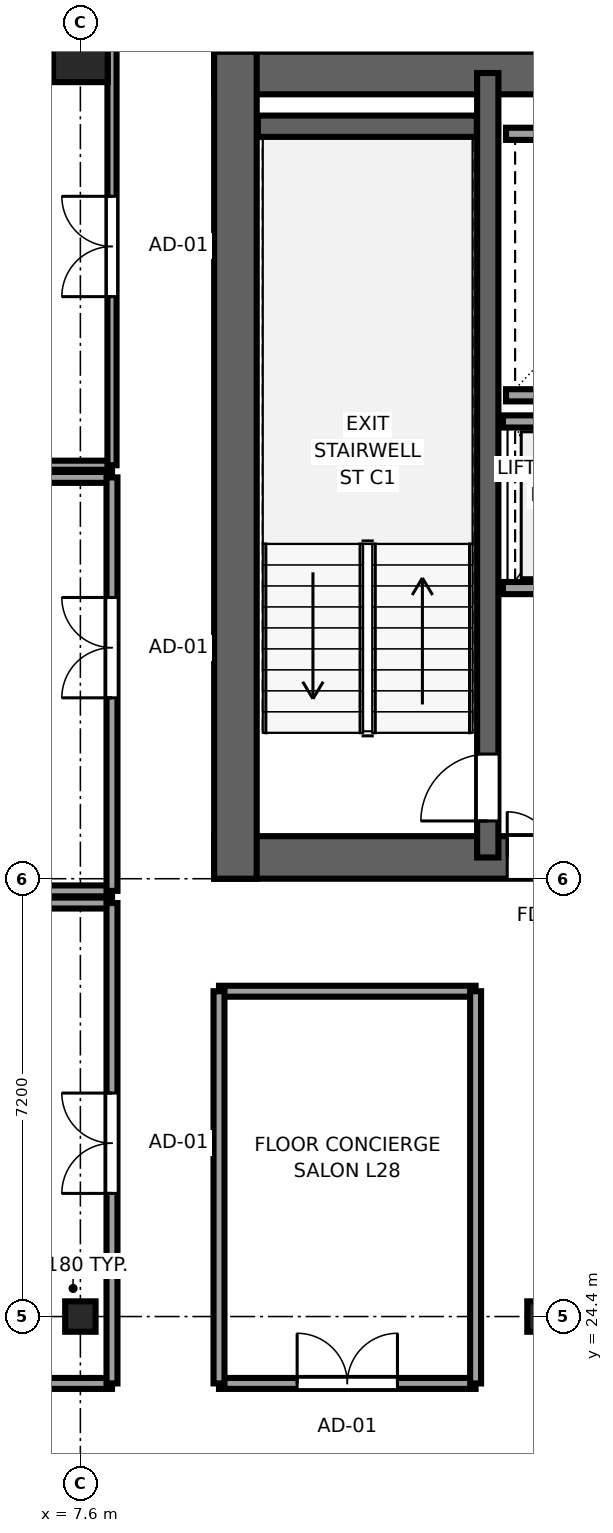
"""IFC4 building model, lengths in metres.
Left out: names, types, materials, properties, quantities, classifications, styles, units other than length and angle.
Written with IfcOpenShell. Run it as: python <this file> out.ifc"""

import sys

from ifc_helpers import new_model, si_unit, direction, frame, frame_2d, origin, origin_2d, place, context, subcontext, project, spatial, rectangle, i_section, extrude, source, transform, mapped, element, fill, save


model = new_model("IFC4")
c1 = context("Model", 3, precision=1e-05, world=origin(), true_north=direction((0.0, 1.0)))
c2 = subcontext(c1, "Body", "Model", "MODEL_VIEW")
j1 = project(units=[si_unit("LENGTHUNIT", "METRE"), si_unit("PLANEANGLEUNIT", "RADIAN")], contexts=[c1])
p1 = place(None, origin())
s1 = spatial("IfcSite", under=j1, at=p1, CompositionType="ELEMENT")
p2 = place(p1, origin())
s2 = spatial("IfcBuilding", under=s1, at=p2, CompositionType="ELEMENT")
p3 = place(p2, frame((0.0, 0.0, 111.55)))
s3 = spatial("IfcBuildingStorey", under=s2, at=p3, CompositionType="ELEMENT", Elevation=111.55)
p4 = place(p3, frame((9.8, 31.95, 0.0), z_axis=(0.0, 0.0, 1.0), x_axis=(1.0, 0.0, 0.0)))
e1 = element("IfcWall", 1, at=p4, inside=s3, PredefinedType="SHEAR", context=c2, shape_type="SweptSolid", body=[
    extrude(rectangle(XDim=26.4, YDim=0.7, at=frame_2d((13.2, 0.0))), origin(), (0.0, 0.0, 1.0), 3.55),
])
p5 = place(p4, frame((6.32, 0.0, 0.0), z_axis=(0.0, 0.0, 1.0), x_axis=(-1.0, 0.0, 0.0)))
e2 = element("IfcOpeningElement", 2, at=p5, cuts=e1, PredefinedType="OPENING", context=c2, shape_type="SweptSolid", body=[
    extrude(rectangle(XDim=1.5, YDim=2.04, at=frame_2d((0.75, 1.02))), frame((0.0, 0.36, 0.0), z_axis=(0.0, -1.0, 0.0), x_axis=(1.0, 0.0, 0.0)), (0.0, 0.0, 1.0), 0.72),
])
p6 = place(p4, frame((13.95, 0.0, 0.0), z_axis=(0.0, 0.0, 1.0), x_axis=(-1.0, 0.0, 0.0)))
e3 = element("IfcOpeningElement", 3, at=p6, cuts=e1, PredefinedType="OPENING", context=c2, shape_type="SweptSolid", body=[
    extrude(rectangle(XDim=1.5, YDim=2.04, at=frame_2d((0.75, 1.02))), frame((0.0, 0.36, 0.0), z_axis=(0.0, -1.0, 0.0), x_axis=(1.0, 0.0, 0.0)), (0.0, 0.0, 1.0), 0.72),
])
p7 = place(p4, frame((20.25, 0.0, 0.0), z_axis=(0.0, 0.0, 1.0), x_axis=(-1.0, 0.0, 0.0)))
e4 = element("IfcOpeningElement", 4, at=p7, cuts=e1, PredefinedType="OPENING", context=c2, shape_type="SweptSolid", body=[
    extrude(rectangle(XDim=1.5, YDim=2.04, at=frame_2d((0.75, 1.02))), frame((0.0, 0.36, 0.0), z_axis=(0.0, -1.0, 0.0), x_axis=(1.0, 0.0, 0.0)), (0.0, 0.0, 1.0), 0.72),
])
p8 = place(p4, frame((8.37, 0.0, 0.0), z_axis=(0.0, 0.0, 1.0), x_axis=(-1.0, 0.0, 0.0)))
e5 = element("IfcOpeningElement", 5, at=p8, cuts=e1, PredefinedType="OPENING", context=c2, shape_type="SweptSolid", body=[
    extrude(rectangle(XDim=0.82, YDim=2.01, at=frame_2d((0.41, 1.005))), frame((0.0, 0.36, 0.0), z_axis=(0.0, -1.0, 0.0), x_axis=(1.0, 0.0, 0.0)), (0.0, 0.0, 1.0), 0.72),
])
p9 = place(p3, frame((9.8, 44.85, 0.0), z_axis=(0.0, 0.0, 1.0), x_axis=(1.0, 0.0, 0.0)))
e6 = element("IfcWall", 6, at=p9, inside=s3, PredefinedType="SHEAR", context=c2, shape_type="SweptSolid", body=[
    extrude(rectangle(XDim=26.4, YDim=0.7, at=frame_2d((13.2, 0.0))), origin(), (0.0, 0.0, 1.0), 3.55),
])
p10 = place(p3, frame((10.15, 31.6, 0.0), z_axis=(0.0, 0.0, 1.0), x_axis=(0.0, 1.0, 0.0)))
e7 = element("IfcWall", 7, at=p10, inside=s3, PredefinedType="SHEAR", context=c2, shape_type="SweptSolid", body=[
    extrude(rectangle(XDim=13.6, YDim=0.7, at=frame_2d((6.8, 0.0))), origin(), (0.0, 0.0, 1.0), 3.55),
])
p11 = place(p3, frame((14.3, 31.95, 0.0), z_axis=(0.0, 0.0, 1.0), x_axis=(0.0, 1.0, 0.0)))
e8 = element("IfcWall", 8, at=p11, inside=s3, PredefinedType="SHEAR", context=c2, shape_type="SweptSolid", body=[
    extrude(rectangle(XDim=12.9, YDim=0.35, at=frame_2d((6.45, 0.0))), origin(), (0.0, 0.0, 1.0), 3.55),
])
p12 = place(p11, frame((0.6, 0.0, 0.0)))
e9 = element("IfcOpeningElement", 9, at=p12, cuts=e8, PredefinedType="OPENING", context=c2, shape_type="SweptSolid", body=[
    extrude(rectangle(XDim=1.1, YDim=2.12, at=frame_2d((0.55, 1.06))), frame((0.0, 0.185, 0.0), z_axis=(0.0, -1.0, 0.0), x_axis=(1.0, 0.0, 0.0)), (0.0, 0.0, 1.0), 0.37),
])
p13 = place(p3, frame((10.52, 43.975, 0.0), z_axis=(0.0, 0.0, 1.0), x_axis=(1.0, 0.0, 0.0)))
e10 = element("IfcWall", 10, at=p13, inside=s3, PredefinedType="SHEAR", context=c2, shape_type="SweptSolid", body=[
    extrude(rectangle(XDim=3.6, YDim=0.35, at=frame_2d((1.8, 0.0))), origin(), (0.0, 0.0, 1.0), 3.55),
])
m1 = source(origin(), c2, "Body", "SweptSolid", [
    extrude(i_section(OverallWidth=0.5, OverallDepth=0.5, WebThickness=0.022, FlangeThickness=0.034, at=origin_2d()), origin(), (0.0, 0.0, 1.0), 3.55),
])
for number, where, z_axis, x_axis in (
    (11, (7.6, 24.4, 0.0), (0.0, 0.0, 1.0), (1.0, 0.0, 0.0)),
    (12, (15.2, 24.4, 0.0), (0.0, 0.0, 1.0), (1.0, 0.0, 0.0)),
):
    element("IfcColumn", number, at=place(p3, frame(where, z_axis=z_axis, x_axis=x_axis)), inside=s3, PredefinedType="COLUMN", context=c2, shape_type="MappedRepresentation", body=[
        mapped(m1, transform((0.0, 0.0, 0.0), x_axis=(1.0, 0.0, 0.0), y_axis=(0.0, 1.0, 0.0), z_axis=(0.0, 0.0, 1.0), scale=1.0)),
    ])
m2 = source(origin(), c2, "Body", "SweptSolid", [
    extrude(rectangle(XDim=0.9, YDim=0.9, at=origin_2d()), origin(), (0.0, 0.0, 1.0), 3.55),
])
p14 = place(p3, frame((7.6, 45.15, 0.0), z_axis=(0.0, 0.0, 1.0), x_axis=(1.0, 0.0, 0.0)))
e13 = element("IfcColumn", 13, at=p14, inside=s3, PredefinedType="COLUMN", context=c2, shape_type="MappedRepresentation", body=[
    mapped(m2, transform((0.0, 0.0, 0.0), x_axis=(1.0, 0.0, 0.0), y_axis=(0.0, 1.0, 0.0), z_axis=(0.0, 0.0, 1.0), scale=1.0)),
])
for number, where, z_axis, x_axis in (
    (14, (14.6, 39.55, 0.0), (0.0, 0.0, 1.0), (1.0, 0.0, 0.0)),
    (15, (14.6, 43.85, 0.0), (0.0, 0.0, 1.0), (1.0, 0.0, 0.0)),
):
    element("IfcWall", number, at=place(p3, frame(where, z_axis=z_axis, x_axis=x_axis)), inside=s3, PredefinedType="SOLIDWALL", context=c2, shape_type="SweptSolid", body=[
        extrude(rectangle(XDim=4.1, YDim=0.2, at=frame_2d((2.05, 0.0))), origin(), (0.0, 0.0, 1.0), 3.37),
    ])
p15 = place(p3, frame((14.55, 36.38, 0.0), z_axis=(0.0, 0.0, 1.0), x_axis=(1.0, 0.0, 0.0)))
e16 = element("IfcWall", 16, at=p15, inside=s3, PredefinedType="SOLIDWALL", context=c2, shape_type="SweptSolid", body=[
    extrude(rectangle(XDim=4.075, YDim=0.2, at=frame_2d((2.038, 0.0))), origin(), (0.0, 0.0, 1.0), 3.37),
])
p16 = place(p15, frame((0.55, 0.0, 0.0)))
e17 = element("IfcOpeningElement", 17, at=p16, cuts=e16, PredefinedType="OPENING", context=c2, shape_type="SweptSolid", body=[
    extrude(rectangle(XDim=1.1, YDim=2.12, at=frame_2d((0.55, 1.06))), frame((0.0, 0.11, 0.0), z_axis=(0.0, -1.0, 0.0), x_axis=(1.0, 0.0, 0.0)), (0.0, 0.0, 1.0), 0.22),
])
p17 = place(p15, frame((2.45, 0.0, 0.0)))
e18 = element("IfcOpeningElement", 18, at=p17, cuts=e16, PredefinedType="OPENING", context=c2, shape_type="SweptSolid", body=[
    extrude(rectangle(XDim=1.1, YDim=2.12, at=frame_2d((0.55, 1.06))), frame((0.0, 0.11, 0.0), z_axis=(0.0, -1.0, 0.0), x_axis=(1.0, 0.0, 0.0)), (0.0, 0.0, 1.0), 0.22),
])
p18 = place(p3, frame((14.55, 39.12, 0.0), z_axis=(0.0, 0.0, 1.0), x_axis=(1.0, 0.0, 0.0)))
e19 = element("IfcWall", 19, at=p18, inside=s3, PredefinedType="SOLIDWALL", context=c2, shape_type="SweptSolid", body=[
    extrude(rectangle(XDim=4.075, YDim=0.2, at=frame_2d((2.038, 0.0))), origin(), (0.0, 0.0, 1.0), 3.37),
])
for number, where, z_axis, x_axis in (
    (20, (0.405, 23.3, 0.0), (0.0, 0.0, 1.0), (1.0, 0.0, 0.0)),
    (21, (0.405, 31.2, 0.0), (0.0, 0.0, 1.0), (1.0, 0.0, 0.0)),
):
    element("IfcWall", number, at=place(p3, frame(where, z_axis=z_axis, x_axis=x_axis)), inside=s3, PredefinedType="PARTITIONING", context=c2, shape_type="SweptSolid", body=[
        extrude(rectangle(XDim=7.715, YDim=0.18, at=frame_2d((3.857, 0.0))), origin(), (0.0, 0.0, 1.0), 3.37),
    ])
p19 = place(p3, frame((8.12, 23.3, 0.0), z_axis=(0.0, 0.0, 1.0), x_axis=(0.0, 1.0, 0.0)))
e22 = element("IfcWall", 22, at=p19, inside=s3, PredefinedType="PARTITIONING", context=c2, shape_type="SweptSolid", body=[
    extrude(rectangle(XDim=7.9, YDim=0.18, at=frame_2d((3.95, 0.0))), origin(), (0.0, 0.0, 1.0), 3.37),
])
p20 = place(p19, frame((3.125, 0.0, 0.0)))
e23 = element("IfcOpeningElement", 23, at=p20, cuts=e22, PredefinedType="OPENING", context=c2, shape_type="SweptSolid", body=[
    extrude(rectangle(XDim=1.65, YDim=2.15, at=frame_2d((0.825, 1.075))), frame((0.0, 0.1, 0.0), z_axis=(0.0, -1.0, 0.0), x_axis=(1.0, 0.0, 0.0)), (0.0, 0.0, 1.0), 0.2),
])
for number, where, z_axis, x_axis in (
    (24, (0.405, 31.4, 0.0), (0.0, 0.0, 1.0), (1.0, 0.0, 0.0)),
    (25, (0.405, 38.2, 0.0), (0.0, 0.0, 1.0), (1.0, 0.0, 0.0)),
):
    element("IfcWall", number, at=place(p3, frame(where, z_axis=z_axis, x_axis=x_axis)), inside=s3, PredefinedType="PARTITIONING", context=c2, shape_type="SweptSolid", body=[
        extrude(rectangle(XDim=7.715, YDim=0.18, at=frame_2d((3.857, 0.0))), origin(), (0.0, 0.0, 1.0), 3.37),
    ])
p21 = place(p3, frame((8.12, 31.4, 0.0), z_axis=(0.0, 0.0, 1.0), x_axis=(0.0, 1.0, 0.0)))
e26 = element("IfcWall", 26, at=p21, inside=s3, PredefinedType="PARTITIONING", context=c2, shape_type="SweptSolid", body=[
    extrude(rectangle(XDim=6.8, YDim=0.18, at=frame_2d((3.4, 0.0))), origin(), (0.0, 0.0, 1.0), 3.37),
])
p22 = place(p21, frame((3.175, 0.0, 0.0)))
e27 = element("IfcOpeningElement", 27, at=p22, cuts=e26, PredefinedType="OPENING", context=c2, shape_type="SweptSolid", body=[
    extrude(rectangle(XDim=1.65, YDim=2.15, at=frame_2d((0.825, 1.075))), frame((0.0, 0.1, 0.0), z_axis=(0.0, -1.0, 0.0), x_axis=(1.0, 0.0, 0.0)), (0.0, 0.0, 1.0), 0.2),
])
p23 = place(p3, frame((0.405, 38.4, 0.0), z_axis=(0.0, 0.0, 1.0), x_axis=(1.0, 0.0, 0.0)))
e28 = element("IfcWall", 28, at=p23, inside=s3, PredefinedType="PARTITIONING", context=c2, shape_type="SweptSolid", body=[
    extrude(rectangle(XDim=7.715, YDim=0.15, at=frame_2d((3.857, 0.0))), origin(), (0.0, 0.0, 1.0), 3.37),
])
p24 = place(p3, frame((8.12, 38.4, 0.0), z_axis=(0.0, 0.0, 1.0), x_axis=(0.0, 1.0, 0.0)))
e29 = element("IfcWall", 29, at=p24, inside=s3, PredefinedType="PARTITIONING", context=c2, shape_type="SweptSolid", body=[
    extrude(rectangle(XDim=7.195, YDim=0.15, at=frame_2d((3.598, 0.0))), origin(), (0.0, 0.0, 1.0), 3.37),
])
p25 = place(p24, frame((2.772, 0.0, 0.0)))
e30 = element("IfcOpeningElement", 30, at=p25, cuts=e29, PredefinedType="OPENING", context=c2, shape_type="SweptSolid", body=[
    extrude(rectangle(XDim=1.65, YDim=2.15, at=frame_2d((0.825, 1.075))), frame((0.0, 0.085, 0.0), z_axis=(0.0, -1.0, 0.0), x_axis=(1.0, 0.0, 0.0)), (0.0, 0.0, 1.0), 0.17),
])
p26 = place(p3, frame((9.88, 23.3, 0.0), z_axis=(0.0, 0.0, 1.0), x_axis=(1.0, 0.0, 0.0)))
e31 = element("IfcWall", 31, at=p26, inside=s3, PredefinedType="PARTITIONING", context=c2, shape_type="SweptSolid", body=[
    extrude(rectangle(XDim=4.22, YDim=0.18, at=frame_2d((2.11, 0.0))), origin(), (0.0, 0.0, 1.0), 3.37),
])
p27 = place(p26, frame((1.285, 0.0, 0.0)))
e32 = element("IfcOpeningElement", 32, at=p27, cuts=e31, PredefinedType="OPENING", context=c2, shape_type="SweptSolid", body=[
    extrude(rectangle(XDim=1.65, YDim=2.15, at=frame_2d((0.825, 1.075))), frame((0.0, 0.1, 0.0), z_axis=(0.0, -1.0, 0.0), x_axis=(1.0, 0.0, 0.0)), (0.0, 0.0, 1.0), 0.2),
])
p28 = place(p3, frame((9.88, 29.75, 0.0), z_axis=(0.0, 0.0, 1.0), x_axis=(1.0, 0.0, 0.0)))
e33 = element("IfcWall", 33, at=p28, inside=s3, PredefinedType="PARTITIONING", context=c2, shape_type="SweptSolid", body=[
    extrude(rectangle(XDim=4.22, YDim=0.18, at=frame_2d((2.11, 0.0))), origin(), (0.0, 0.0, 1.0), 3.37),
])
for number, where, z_axis, x_axis in (
    (34, (9.88, 23.3, 0.0), (0.0, 0.0, 1.0), (0.0, 1.0, 0.0)),
    (35, (14.1, 23.3, 0.0), (0.0, 0.0, 1.0), (0.0, 1.0, 0.0)),
):
    element("IfcWall", number, at=place(p3, frame(where, z_axis=z_axis, x_axis=x_axis)), inside=s3, PredefinedType="PARTITIONING", context=c2, shape_type="SweptSolid", body=[
        extrude(rectangle(XDim=6.45, YDim=0.18, at=frame_2d((3.225, 0.0))), origin(), (0.0, 0.0, 1.0), 3.37),
    ])
m3 = source(origin(), c2, "Body", "SweptSolid", [
    extrude(rectangle(XDim=1.1, YDim=2.12, at=frame_2d((0.55, 1.06))), frame((0.0, 0.025, 0.0), z_axis=(0.0, -1.0, 0.0), x_axis=(1.0, 0.0, 0.0)), (0.0, 0.0, 1.0), 0.05),
])
p29 = place(p12, origin())
e36 = element("IfcDoor", 36, at=p29, inside=s3, OperationType="SINGLE_SWING_LEFT", PredefinedType="DOOR", context=c2, shape_type="MappedRepresentation", body=[
    mapped(m3, transform((0.0, 0.0, 0.0), x_axis=(1.0, 0.0, 0.0), y_axis=(0.0, 1.0, 0.0), z_axis=(0.0, 0.0, 1.0), scale=1.0)),
])
fill(e9, e36)
m4 = source(origin(), c2, "Body", "SweptSolid", [
    extrude(rectangle(XDim=1.5, YDim=2.04, at=frame_2d((0.75, 1.02))), frame((0.0, 0.025, 0.0), z_axis=(0.0, -1.0, 0.0), x_axis=(1.0, 0.0, 0.0)), (0.0, 0.0, 1.0), 0.05),
])
p30 = place(p5, origin())
e37 = element("IfcDoor", 37, at=p30, inside=s3, OperationType="DOUBLE_DOOR_SINGLE_SWING", PredefinedType="DOOR", context=c2, shape_type="MappedRepresentation", body=[
    mapped(m4, transform((0.0, 0.0, 0.0), x_axis=(1.0, 0.0, 0.0), y_axis=(0.0, 1.0, 0.0), z_axis=(0.0, 0.0, 1.0), scale=1.0)),
])
fill(e2, e37)
m5 = source(origin(), c2, "Body", "SweptSolid", [
    extrude(rectangle(XDim=1.65, YDim=2.15, at=frame_2d((0.825, 1.075))), frame((0.0, 0.025, 0.0), z_axis=(0.0, -1.0, 0.0), x_axis=(1.0, 0.0, 0.0)), (0.0, 0.0, 1.0), 0.05),
])
p31 = place(p20, origin())
e38 = element("IfcDoor", 38, at=p31, inside=s3, OperationType="DOUBLE_DOOR_SINGLE_SWING", PredefinedType="DOOR", context=c2, shape_type="MappedRepresentation", body=[
    mapped(m5, transform((0.0, 0.0, 0.0), x_axis=(1.0, 0.0, 0.0), y_axis=(0.0, 1.0, 0.0), z_axis=(0.0, 0.0, 1.0), scale=1.0)),
])
fill(e23, e38)
p32 = place(p22, origin())
e39 = element("IfcDoor", 39, at=p32, inside=s3, OperationType="DOUBLE_DOOR_SINGLE_SWING", PredefinedType="DOOR", context=c2, shape_type="MappedRepresentation", body=[
    mapped(m5, transform((0.0, 0.0, 0.0), x_axis=(1.0, 0.0, 0.0), y_axis=(0.0, 1.0, 0.0), z_axis=(0.0, 0.0, 1.0), scale=1.0)),
])
fill(e27, e39)
p33 = place(p25, origin())
e40 = element("IfcDoor", 40, at=p33, inside=s3, OperationType="DOUBLE_DOOR_SINGLE_SWING", PredefinedType="DOOR", context=c2, shape_type="MappedRepresentation", body=[
    mapped(m5, transform((0.0, 0.0, 0.0), x_axis=(1.0, 0.0, 0.0), y_axis=(0.0, 1.0, 0.0), z_axis=(0.0, 0.0, 1.0), scale=1.0)),
])
fill(e30, e40)
p34 = place(p27, origin())
e41 = element("IfcDoor", 41, at=p34, inside=s3, OperationType="DOUBLE_DOOR_SINGLE_SWING", PredefinedType="DOOR", context=c2, shape_type="MappedRepresentation", body=[
    mapped(m5, transform((0.0, 0.0, 0.0), x_axis=(1.0, 0.0, 0.0), y_axis=(0.0, 1.0, 0.0), z_axis=(0.0, 0.0, 1.0), scale=1.0)),
])
fill(e32, e41)
save(model, sys.argv[1])
